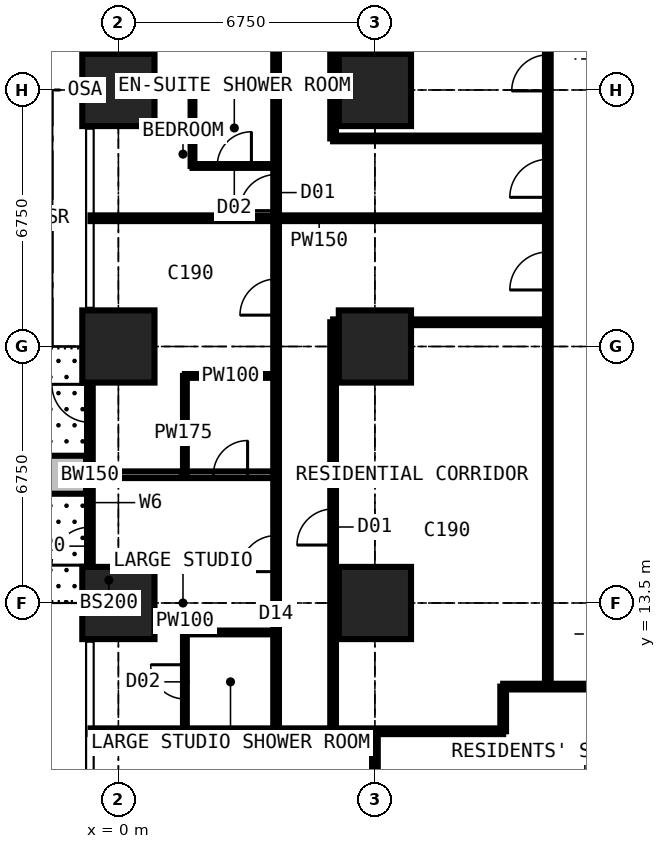
"""IFC4 building model, lengths in metres.
Left out: names, types, materials, properties, quantities, classifications, styles, units other than length and angle.
Written with IfcOpenShell. Run it as: python <this file> out.ifc"""

import sys

from ifc_helpers import new_model, si_unit, direction, frame, frame_2d, origin, origin_2d, place, context, subcontext, project, spatial, rectangle, extrude, element, fill, save


model = new_model("IFC4")
c1 = context("Model", 3, precision=1e-05, world=origin(), true_north=direction((0.0, 1.0)))
c2 = subcontext(c1, "Body", "Model", "MODEL_VIEW")
j1 = project(units=[si_unit("LENGTHUNIT", "METRE"), si_unit("PLANEANGLEUNIT", "RADIAN")], contexts=[c1])
p1 = place(None, origin())
s1 = spatial("IfcSite", under=j1, at=p1, CompositionType="ELEMENT")
p2 = place(p1, origin())
s2 = spatial("IfcBuilding", under=s1, at=p2, CompositionType="ELEMENT")
p3 = place(p2, frame((0.0, 0.0, 32.4)))
s3 = spatial("IfcBuildingStorey", under=s2, at=p3, CompositionType="ELEMENT", Elevation=32.4)
for number, where, z_axis, x_axis in (
    (1, (0.0, 13.5, 0.0), (0.0, 0.0, 1.0), (1.0, 0.0, 0.0)),
    (2, (0.0, 20.25, 0.0), (0.0, 0.0, 1.0), (1.0, 0.0, 0.0)),
    (3, (0.0, 27.0, 0.0), (0.0, 0.0, 1.0), (1.0, 0.0, 0.0)),
    (4, (6.75, 13.5, 0.0), (0.0, 0.0, 1.0), (1.0, 0.0, 0.0)),
    (5, (6.75, 20.25, 0.0), (0.0, 0.0, 1.0), (1.0, 0.0, 0.0)),
    (6, (6.75, 27.0, 0.0), (0.0, 0.0, 1.0), (1.0, 0.0, 0.0)),
):
    element("IfcColumn", number, at=place(p3, frame(where, z_axis=z_axis, x_axis=x_axis)), inside=s3, PredefinedType="COLUMN", context=c2, shape_type="SweptSolid", body=[
        extrude(rectangle(XDim=1.9, YDim=1.9, at=origin_2d()), origin(), (0.0, 0.0, 1.0), 3.6),
    ])
p4 = place(p3, frame((-0.75, 13.5, 0.0), z_axis=(0.0, 0.0, 1.0), x_axis=(0.0, 1.0, 0.0)))
e7 = element("IfcWall", 7, at=p4, inside=s3, PredefinedType="SOLIDWALL", context=c2, shape_type="SweptSolid", body=[
    extrude(rectangle(XDim=6.75, YDim=0.15, at=frame_2d((3.375, 0.0))), origin(), (0.0, 0.0, 1.0), 3.375),
])
p5 = place(p4, frame((0.996, 0.0, 0.0)))
e8 = element("IfcOpeningElement", 8, at=p5, cuts=e7, PredefinedType="OPENING", context=c2, shape_type="SweptSolid", body=[
    extrude(rectangle(XDim=1.0, YDim=2.2, at=frame_2d((0.5, 1.1))), frame((0.0, 0.085, 0.0), z_axis=(0.0, -1.0, 0.0), x_axis=(1.0, 0.0, 0.0)), (0.0, 0.0, 1.0), 0.17),
])
p6 = place(p4, frame((2.042, 0.0, 0.9)))
e9 = element("IfcOpeningElement", 9, at=p6, cuts=e7, PredefinedType="OPENING", context=c2, shape_type="SweptSolid", body=[
    extrude(rectangle(XDim=1.2, YDim=1.8, at=frame_2d((0.6, 0.9))), frame((0.0, 0.085, 0.0), z_axis=(0.0, -1.0, 0.0), x_axis=(1.0, 0.0, 0.0)), (0.0, 0.0, 1.0), 0.17),
])
p7 = place(p4, frame((4.754, 0.0, 0.0)))
e10 = element("IfcOpeningElement", 10, at=p7, cuts=e7, PredefinedType="OPENING", context=c2, shape_type="SweptSolid", body=[
    extrude(rectangle(XDim=1.0, YDim=2.2, at=frame_2d((0.5, 1.1))), frame((0.0, 0.085, 0.0), z_axis=(0.0, -1.0, 0.0), x_axis=(1.0, 0.0, 0.0)), (0.0, 0.0, 1.0), 0.17),
])
p8 = place(p4, frame((3.508, 0.0, 0.9)))
e11 = element("IfcOpeningElement", 11, at=p8, cuts=e7, PredefinedType="OPENING", context=c2, shape_type="SweptSolid", body=[
    extrude(rectangle(XDim=1.2, YDim=1.8, at=frame_2d((0.6, 0.9))), frame((0.0, 0.085, 0.0), z_axis=(0.0, -1.0, 0.0), x_axis=(1.0, 0.0, 0.0)), (0.0, 0.0, 1.0), 0.17),
])
p9 = place(p3, frame((-0.85, 16.875, 0.0), z_axis=(0.0, 0.0, 1.0), x_axis=(-1.0, 0.0, 0.0)))
e12 = element("IfcWall", 12, at=p9, inside=s3, PredefinedType="USERDEFINED", context=c2, shape_type="SweptSolid", body=[
    extrude(rectangle(XDim=2.2, YDim=1.0, at=frame_2d((1.1, 0.0))), origin(), (0.0, 0.0, 1.0), 0.9),
])
p10 = place(p3, frame((-0.734, 10.125, 0.0), z_axis=(0.0, 0.0, 1.0), x_axis=(1.0, 0.0, 0.0)))
e13 = element("IfcWall", 13, at=p10, inside=s3, PredefinedType="PARTITIONING", context=c2, shape_type="SweptSolid", body=[
    extrude(rectangle(XDim=10.859, YDim=0.15, at=frame_2d((5.429, 0.0))), origin(), (0.0, 0.0, 1.0), 3.375),
])
p11 = place(p3, frame((-0.734, 16.875, 0.0), z_axis=(0.0, 0.0, 1.0), x_axis=(1.0, 0.0, 0.0)))
e14 = element("IfcWall", 14, at=p11, inside=s3, PredefinedType="PARTITIONING", context=c2, shape_type="SweptSolid", body=[
    extrude(rectangle(XDim=4.884, YDim=0.175, at=frame_2d((2.442, 0.0))), origin(), (0.0, 0.0, 1.0), 3.375),
])
p12 = place(p11, frame((3.234, 0.0, 0.0)))
e15 = element("IfcOpeningElement", 15, at=p12, cuts=e14, PredefinedType="OPENING", context=c2, shape_type="SweptSolid", body=[
    extrude(rectangle(XDim=0.9, YDim=2.2, at=frame_2d((0.45, 1.1))), frame((0.0, 0.097, 0.0), z_axis=(0.0, -1.0, 0.0), x_axis=(1.0, 0.0, 0.0)), (0.0, 0.0, 1.0), 0.195),
])
p13 = place(p3, frame((-0.734, 23.625, 0.0), z_axis=(0.0, 0.0, 1.0), x_axis=(1.0, 0.0, 0.0)))
e16 = element("IfcWall", 16, at=p13, inside=s3, PredefinedType="PARTITIONING", context=c2, shape_type="SweptSolid", body=[
    extrude(rectangle(XDim=12.034, YDim=0.15, at=frame_2d((6.017, 0.0))), origin(), (0.0, 0.0, 1.0), 3.375),
])
p14 = place(p3, frame((-0.734, 27.0, 0.0), z_axis=(0.0, 0.0, 1.0), x_axis=(1.0, 0.0, 0.0)))
e17 = element("IfcWall", 17, at=p14, inside=s3, PredefinedType="PARTITIONING", context=c2, shape_type="SweptSolid", body=[
    extrude(rectangle(XDim=4.884, YDim=0.15, at=frame_2d((2.442, 0.0))), origin(), (0.0, 0.0, 1.0), 2.61),
])
p15 = place(p3, frame((1.75, 10.125, 0.0), z_axis=(0.0, 0.0, 1.0), x_axis=(0.0, 1.0, 0.0)))
e18 = element("IfcWall", 18, at=p15, inside=s3, PredefinedType="PARTITIONING", context=c2, shape_type="SweptSolid", body=[
    extrude(rectangle(XDim=2.6, YDim=0.1, at=frame_2d((1.3, 0.0))), origin(), (0.0, 0.0, 1.0), 3.375),
])
p16 = place(p15, frame((0.85, 0.0, 0.0)))
e19 = element("IfcOpeningElement", 19, at=p16, cuts=e18, PredefinedType="OPENING", context=c2, shape_type="SweptSolid", body=[
    extrude(rectangle(XDim=0.9, YDim=2.2, at=frame_2d((0.45, 1.1))), frame((0.0, 0.06, 0.0), z_axis=(0.0, -1.0, 0.0), x_axis=(1.0, 0.0, 0.0)), (0.0, 0.0, 1.0), 0.12),
])
p17 = place(p3, frame((1.75, 12.725, 0.0), z_axis=(0.0, 0.0, 1.0), x_axis=(1.0, 0.0, 0.0)))
e20 = element("IfcWall", 20, at=p17, inside=s3, PredefinedType="PARTITIONING", context=c2, shape_type="SweptSolid", body=[
    extrude(rectangle(XDim=2.4, YDim=0.1, at=frame_2d((1.2, 0.0))), origin(), (0.0, 0.0, 1.0), 3.375),
])
p18 = place(p3, frame((1.75, 16.875, 0.0), z_axis=(0.0, 0.0, 1.0), x_axis=(0.0, 1.0, 0.0)))
e21 = element("IfcWall", 21, at=p18, inside=s3, PredefinedType="PARTITIONING", context=c2, shape_type="SweptSolid", body=[
    extrude(rectangle(XDim=2.6, YDim=0.1, at=frame_2d((1.3, 0.0))), origin(), (0.0, 0.0, 1.0), 3.375),
])
p19 = place(p3, frame((1.75, 19.475, 0.0), z_axis=(0.0, 0.0, 1.0), x_axis=(1.0, 0.0, 0.0)))
e22 = element("IfcWall", 22, at=p19, inside=s3, PredefinedType="PARTITIONING", context=c2, shape_type="SweptSolid", body=[
    extrude(rectangle(XDim=2.4, YDim=0.1, at=frame_2d((1.2, 0.0))), origin(), (0.0, 0.0, 1.0), 3.375),
])
p20 = place(p3, frame((1.95, 25.0, 0.0), z_axis=(0.0, 0.0, 1.0), x_axis=(0.0, 1.0, 0.0)))
e23 = element("IfcWall", 23, at=p20, inside=s3, PredefinedType="PARTITIONING", context=c2, shape_type="SweptSolid", body=[
    extrude(rectangle(XDim=2.0, YDim=0.1, at=frame_2d((1.0, 0.0))), origin(), (0.0, 0.0, 1.0), 3.375),
])
p21 = place(p3, frame((1.95, 25.0, 0.0), z_axis=(0.0, 0.0, 1.0), x_axis=(1.0, 0.0, 0.0)))
e24 = element("IfcWall", 24, at=p21, inside=s3, PredefinedType="PARTITIONING", context=c2, shape_type="SweptSolid", body=[
    extrude(rectangle(XDim=2.2, YDim=0.1, at=frame_2d((1.1, 0.0))), origin(), (0.0, 0.0, 1.0), 3.375),
])
p22 = place(p21, frame((0.65, 0.0, 0.0)))
e25 = element("IfcOpeningElement", 25, at=p22, cuts=e24, PredefinedType="OPENING", context=c2, shape_type="SweptSolid", body=[
    extrude(rectangle(XDim=0.9, YDim=2.2, at=frame_2d((0.45, 1.1))), frame((0.0, 0.06, 0.0), z_axis=(0.0, -1.0, 0.0), x_axis=(1.0, 0.0, 0.0)), (0.0, 0.0, 1.0), 0.12),
])
p23 = place(p3, frame((4.15, 10.125, 0.0), z_axis=(0.0, 0.0, 1.0), x_axis=(0.0, 1.0, 0.0)))
e26 = element("IfcWall", 26, at=p23, inside=s3, PredefinedType="PARTITIONING", context=c2, shape_type="SweptSolid", body=[
    extrude(rectangle(XDim=23.625, YDim=0.15, at=frame_2d((11.812, 0.0))), origin(), (0.0, 0.0, 1.0), 3.375),
])
p24 = place(p23, frame((19.775, 0.0, 0.0)))
e27 = element("IfcOpeningElement", 27, at=p24, cuts=e26, PredefinedType="OPENING", context=c2, shape_type="SweptSolid", body=[
    extrude(rectangle(XDim=1.0, YDim=2.2, at=frame_2d((0.5, 1.1))), frame((0.0, 0.085, 0.0), z_axis=(0.0, -1.0, 0.0), x_axis=(1.0, 0.0, 0.0)), (0.0, 0.0, 1.0), 0.17),
])
p25 = place(p23, frame((13.7, 0.0, 0.0)))
e28 = element("IfcOpeningElement", 28, at=p25, cuts=e26, PredefinedType="OPENING", context=c2, shape_type="SweptSolid", body=[
    extrude(rectangle(XDim=0.95, YDim=2.2, at=frame_2d((0.475, 1.1))), frame((0.0, 0.085, 0.0), z_axis=(0.0, -1.0, 0.0), x_axis=(1.0, 0.0, 0.0)), (0.0, 0.0, 1.0), 0.17),
])
p26 = place(p23, frame((4.2, 0.0, 0.0)))
e29 = element("IfcOpeningElement", 29, at=p26, cuts=e26, PredefinedType="OPENING", context=c2, shape_type="SweptSolid", body=[
    extrude(rectangle(XDim=0.95, YDim=2.2, at=frame_2d((0.475, 1.1))), frame((0.0, 0.085, 0.0), z_axis=(0.0, -1.0, 0.0), x_axis=(1.0, 0.0, 0.0)), (0.0, 0.0, 1.0), 0.17),
])
p27 = place(p23, frame((10.95, 0.0, 0.0)))
e30 = element("IfcOpeningElement", 30, at=p27, cuts=e26, PredefinedType="OPENING", context=c2, shape_type="SweptSolid", body=[
    extrude(rectangle(XDim=0.95, YDim=2.2, at=frame_2d((0.475, 1.1))), frame((0.0, 0.085, 0.0), z_axis=(0.0, -1.0, 0.0), x_axis=(1.0, 0.0, 0.0)), (0.0, 0.0, 1.0), 0.17),
])
p28 = place(p3, frame((5.65, 10.125, 0.0), z_axis=(0.0, 0.0, 1.0), x_axis=(0.0, 1.0, 0.0)))
e31 = element("IfcWall", 31, at=p28, inside=s3, PredefinedType="PARTITIONING", context=c2, shape_type="SweptSolid", body=[
    extrude(rectangle(XDim=10.762, YDim=0.15, at=frame_2d((5.381, 0.0))), origin(), (0.0, 0.0, 1.0), 3.375),
])
p29 = place(p28, frame((4.9, 0.0, 0.0)))
e32 = element("IfcOpeningElement", 32, at=p29, cuts=e31, PredefinedType="OPENING", context=c2, shape_type="SweptSolid", body=[
    extrude(rectangle(XDim=0.95, YDim=2.2, at=frame_2d((0.475, 1.1))), frame((0.0, 0.085, 0.0), z_axis=(0.0, -1.0, 0.0), x_axis=(1.0, 0.0, 0.0)), (0.0, 0.0, 1.0), 0.17),
])
p30 = place(p3, frame((5.65, 20.887, 0.0), z_axis=(0.0, 0.0, 1.0), x_axis=(1.0, 0.0, 0.0)))
e33 = element("IfcWall", 33, at=p30, inside=s3, PredefinedType="PARTITIONING", context=c2, shape_type="SweptSolid", body=[
    extrude(rectangle(XDim=5.65, YDim=0.15, at=frame_2d((2.825, 0.0))), origin(), (0.0, 0.0, 1.0), 3.375),
])
p31 = place(p3, frame((5.65, 25.725, 0.0), z_axis=(0.0, 0.0, 1.0), x_axis=(0.0, 1.0, 0.0)))
e34 = element("IfcWall", 34, at=p31, inside=s3, PredefinedType="PARTITIONING", context=c2, shape_type="SweptSolid", body=[
    extrude(rectangle(XDim=8.025, YDim=0.15, at=frame_2d((4.012, 0.0))), origin(), (0.0, 0.0, 1.0), 3.375),
])
p32 = place(p3, frame((5.65, 25.725, 0.0), z_axis=(0.0, 0.0, 1.0), x_axis=(1.0, 0.0, 0.0)))
e35 = element("IfcWall", 35, at=p32, inside=s3, PredefinedType="PARTITIONING", context=c2, shape_type="SweptSolid", body=[
    extrude(rectangle(XDim=5.65, YDim=0.15, at=frame_2d((2.825, 0.0))), origin(), (0.0, 0.0, 1.0), 3.375),
])
p33 = place(p3, frame((6.75, 4.15, 0.0), z_axis=(0.0, 0.0, 1.0), x_axis=(0.0, 1.0, 0.0)))
e36 = element("IfcWall", 36, at=p33, inside=s3, PredefinedType="PARTITIONING", context=c2, shape_type="SweptSolid", body=[
    extrude(rectangle(XDim=5.975, YDim=0.15, at=frame_2d((2.988, 0.0))), origin(), (0.0, 0.0, 1.0), 2.877),
])
p34 = place(p3, frame((10.125, 10.125, 0.0), z_axis=(0.0, 0.0, 1.0), x_axis=(0.0, 1.0, 0.0)))
e37 = element("IfcWall", 37, at=p34, inside=s3, PredefinedType="PARTITIONING", context=c2, shape_type="SweptSolid", body=[
    extrude(rectangle(XDim=1.175, YDim=0.15, at=frame_2d((0.587, 0.0))), origin(), (0.0, 0.0, 1.0), 3.375),
])
p35 = place(p3, frame((10.125, 11.3, 0.0), z_axis=(0.0, 0.0, 1.0), x_axis=(1.0, 0.0, 0.0)))
e38 = element("IfcWall", 38, at=p35, inside=s3, PredefinedType="PARTITIONING", context=c2, shape_type="SweptSolid", body=[
    extrude(rectangle(XDim=20.675, YDim=0.15, at=frame_2d((10.337, 0.0))), origin(), (0.0, 0.0, 1.0), 3.375),
])
p36 = place(p35, frame((8.375, 0.0, 0.0)))
e39 = element("IfcOpeningElement", 39, at=p36, cuts=e38, PredefinedType="OPENING", context=c2, shape_type="SweptSolid", body=[
    extrude(rectangle(XDim=1.0, YDim=2.2, at=frame_2d((0.5, 1.1))), frame((0.0, 0.085, 0.0), z_axis=(0.0, -1.0, 0.0), x_axis=(1.0, 0.0, 0.0)), (0.0, 0.0, 1.0), 0.17),
])
p37 = place(p35, frame((10.975, 0.0, 0.0)))
e40 = element("IfcOpeningElement", 40, at=p37, cuts=e38, PredefinedType="OPENING", context=c2, shape_type="SweptSolid", body=[
    extrude(rectangle(XDim=1.0, YDim=2.2, at=frame_2d((0.5, 1.1))), frame((0.0, 0.085, 0.0), z_axis=(0.0, -1.0, 0.0), x_axis=(1.0, 0.0, 0.0)), (0.0, 0.0, 1.0), 0.17),
])
p38 = place(p35, frame((3.925, 0.0, 0.0)))
e41 = element("IfcOpeningElement", 41, at=p38, cuts=e38, PredefinedType="OPENING", context=c2, shape_type="SweptSolid", body=[
    extrude(rectangle(XDim=0.95, YDim=2.2, at=frame_2d((0.475, 1.1))), frame((0.0, 0.085, 0.0), z_axis=(0.0, -1.0, 0.0), x_axis=(1.0, 0.0, 0.0)), (0.0, 0.0, 1.0), 0.17),
])
p39 = place(p3, frame((11.3, 11.3, 0.0), z_axis=(0.0, 0.0, 1.0), x_axis=(0.0, 1.0, 0.0)))
e42 = element("IfcWall", 42, at=p39, inside=s3, PredefinedType="PARTITIONING", context=c2, shape_type="SweptSolid", body=[
    extrude(rectangle(XDim=19.075, YDim=0.15, at=frame_2d((9.538, 0.0))), origin(), (0.0, 0.0, 1.0), 3.375),
])
p40 = place(p39, frame((12.875, 0.0, 0.0)))
e43 = element("IfcOpeningElement", 43, at=p40, cuts=e42, PredefinedType="OPENING", context=c2, shape_type="SweptSolid", body=[
    extrude(rectangle(XDim=1.0, YDim=2.2, at=frame_2d((0.5, 1.1))), frame((0.0, 0.085, 0.0), z_axis=(0.0, -1.0, 0.0), x_axis=(1.0, 0.0, 0.0)), (0.0, 0.0, 1.0), 0.17),
])
p41 = place(p39, frame((10.438, 0.0, 0.0)))
e44 = element("IfcOpeningElement", 44, at=p41, cuts=e42, PredefinedType="OPENING", context=c2, shape_type="SweptSolid", body=[
    extrude(rectangle(XDim=1.0, YDim=2.2, at=frame_2d((0.5, 1.1))), frame((0.0, 0.085, 0.0), z_axis=(0.0, -1.0, 0.0), x_axis=(1.0, 0.0, 0.0)), (0.0, 0.0, 1.0), 0.17),
])
p42 = place(p39, frame((15.675, 0.0, 0.0)))
e45 = element("IfcOpeningElement", 45, at=p42, cuts=e42, PredefinedType="OPENING", context=c2, shape_type="SweptSolid", body=[
    extrude(rectangle(XDim=0.95, YDim=2.2, at=frame_2d((0.475, 1.1))), frame((0.0, 0.085, 0.0), z_axis=(0.0, -1.0, 0.0), x_axis=(1.0, 0.0, 0.0)), (0.0, 0.0, 1.0), 0.17),
])
p43 = place(p5, origin())
e46 = element("IfcDoor", 46, at=p43, inside=s3, OperationType="SINGLE_SWING_LEFT", PredefinedType="DOOR", context=c2, shape_type="SweptSolid", body=[
    extrude(rectangle(XDim=1.0, YDim=2.2, at=frame_2d((0.5, 1.1))), frame((0.0, 0.025, 0.0), z_axis=(0.0, -1.0, 0.0), x_axis=(1.0, 0.0, 0.0)), (0.0, 0.0, 1.0), 0.05),
])
fill(e8, e46)
p44 = place(p6, origin())
e47 = element("IfcWindow", 47, at=p44, inside=s3, PartitioningType="SINGLE_PANEL", PredefinedType="WINDOW", context=c2, shape_type="SweptSolid", body=[
    extrude(rectangle(XDim=1.2, YDim=1.8, at=frame_2d((0.6, 0.9))), frame((0.0, 0.03, 0.0), z_axis=(0.0, -1.0, 0.0), x_axis=(1.0, 0.0, 0.0)), (0.0, 0.0, 1.0), 0.06),
])
fill(e9, e47)
p45 = place(p7, origin())
e48 = element("IfcDoor", 48, at=p45, inside=s3, OperationType="SINGLE_SWING_RIGHT", PredefinedType="DOOR", context=c2, shape_type="SweptSolid", body=[
    extrude(rectangle(XDim=1.0, YDim=2.2, at=frame_2d((0.5, 1.1))), frame((0.0, 0.025, 0.0), z_axis=(0.0, -1.0, 0.0), x_axis=(1.0, 0.0, 0.0)), (0.0, 0.0, 1.0), 0.05),
])
fill(e10, e48)
p46 = place(p8, origin())
e49 = element("IfcWindow", 49, at=p46, inside=s3, PartitioningType="SINGLE_PANEL", PredefinedType="WINDOW", context=c2, shape_type="SweptSolid", body=[
    extrude(rectangle(XDim=1.2, YDim=1.8, at=frame_2d((0.6, 0.9))), frame((0.0, 0.03, 0.0), z_axis=(0.0, -1.0, 0.0), x_axis=(1.0, 0.0, 0.0)), (0.0, 0.0, 1.0), 0.06),
])
fill(e11, e49)
p47 = place(p25, origin())
e50 = element("IfcDoor", 50, at=p47, inside=s3, OperationType="SINGLE_SWING_LEFT", PredefinedType="DOOR", context=c2, shape_type="SweptSolid", body=[
    extrude(rectangle(XDim=0.95, YDim=2.2, at=frame_2d((0.475, 1.1))), frame((0.0, 0.025, 0.0), z_axis=(0.0, -1.0, 0.0), x_axis=(1.0, 0.0, 0.0)), (0.0, 0.0, 1.0), 0.05),
])
fill(e28, e50)
p48 = place(p22, origin())
e51 = element("IfcDoor", 51, at=p48, inside=s3, OperationType="SINGLE_SWING_RIGHT", PredefinedType="DOOR", context=c2, shape_type="SweptSolid", body=[
    extrude(rectangle(XDim=0.9, YDim=2.2, at=frame_2d((0.45, 1.1))), frame((0.0, 0.025, 0.0), z_axis=(0.0, -1.0, 0.0), x_axis=(1.0, 0.0, 0.0)), (0.0, 0.0, 1.0), 0.05),
])
fill(e25, e51)
p49 = place(p40, origin())
e52 = element("IfcDoor", 52, at=p49, inside=s3, OperationType="SINGLE_SWING_LEFT", PredefinedType="DOOR", context=c2, shape_type="SweptSolid", body=[
    extrude(rectangle(XDim=1.0, YDim=2.2, at=frame_2d((0.5, 1.1))), frame((0.0, 0.025, 0.0), z_axis=(0.0, -1.0, 0.0), x_axis=(1.0, 0.0, 0.0)), (0.0, 0.0, 1.0), 0.05),
])
fill(e43, e52)
p50 = place(p26, origin())
e53 = element("IfcDoor", 53, at=p50, inside=s3, OperationType="SINGLE_SWING_LEFT", PredefinedType="DOOR", context=c2, shape_type="SweptSolid", body=[
    extrude(rectangle(XDim=0.95, YDim=2.2, at=frame_2d((0.475, 1.1))), frame((0.0, 0.025, 0.0), z_axis=(0.0, -1.0, 0.0), x_axis=(1.0, 0.0, 0.0)), (0.0, 0.0, 1.0), 0.05),
])
fill(e29, e53)
p51 = place(p16, origin())
e54 = element("IfcDoor", 54, at=p51, inside=s3, OperationType="SINGLE_SWING_RIGHT", PredefinedType="DOOR", context=c2, shape_type="SweptSolid", body=[
    extrude(rectangle(XDim=0.9, YDim=2.2, at=frame_2d((0.45, 1.1))), frame((0.0, 0.025, 0.0), z_axis=(0.0, -1.0, 0.0), x_axis=(1.0, 0.0, 0.0)), (0.0, 0.0, 1.0), 0.05),
])
fill(e19, e54)
p52 = place(p27, origin())
e55 = element("IfcDoor", 55, at=p52, inside=s3, OperationType="SINGLE_SWING_LEFT", PredefinedType="DOOR", context=c2, shape_type="SweptSolid", body=[
    extrude(rectangle(XDim=0.95, YDim=2.2, at=frame_2d((0.475, 1.1))), frame((0.0, 0.025, 0.0), z_axis=(0.0, -1.0, 0.0), x_axis=(1.0, 0.0, 0.0)), (0.0, 0.0, 1.0), 0.05),
])
fill(e30, e55)
p53 = place(p12, origin())
e56 = element("IfcDoor", 56, at=p53, inside=s3, OperationType="SINGLE_SWING_RIGHT", PredefinedType="DOOR", context=c2, shape_type="SweptSolid", body=[
    extrude(rectangle(XDim=0.9, YDim=2.2, at=frame_2d((0.45, 1.1))), frame((0.0, 0.025, 0.0), z_axis=(0.0, -1.0, 0.0), x_axis=(1.0, 0.0, 0.0)), (0.0, 0.0, 1.0), 0.05),
])
fill(e15, e56)
p54 = place(p41, origin())
e57 = element("IfcDoor", 57, at=p54, inside=s3, OperationType="SINGLE_SWING_LEFT", PredefinedType="DOOR", context=c2, shape_type="SweptSolid", body=[
    extrude(rectangle(XDim=1.0, YDim=2.2, at=frame_2d((0.5, 1.1))), frame((0.0, 0.025, 0.0), z_axis=(0.0, -1.0, 0.0), x_axis=(1.0, 0.0, 0.0)), (0.0, 0.0, 1.0), 0.05),
])
fill(e44, e57)
p55 = place(p42, origin())
e58 = element("IfcDoor", 58, at=p55, inside=s3, OperationType="SINGLE_SWING_LEFT", PredefinedType="DOOR", context=c2, shape_type="SweptSolid", body=[
    extrude(rectangle(XDim=0.95, YDim=2.2, at=frame_2d((0.475, 1.1))), frame((0.0, 0.025, 0.0), z_axis=(0.0, -1.0, 0.0), x_axis=(1.0, 0.0, 0.0)), (0.0, 0.0, 1.0), 0.05),
])
fill(e45, e58)
p56 = place(p29, origin())
e59 = element("IfcDoor", 59, at=p56, inside=s3, OperationType="SINGLE_SWING_LEFT", PredefinedType="DOOR", context=c2, shape_type="SweptSolid", body=[
    extrude(rectangle(XDim=0.95, YDim=2.2, at=frame_2d((0.475, 1.1))), frame((0.0, 0.025, 0.0), z_axis=(0.0, -1.0, 0.0), x_axis=(1.0, 0.0, 0.0)), (0.0, 0.0, 1.0), 0.05),
])
fill(e32, e59)
save(model, sys.argv[1])
